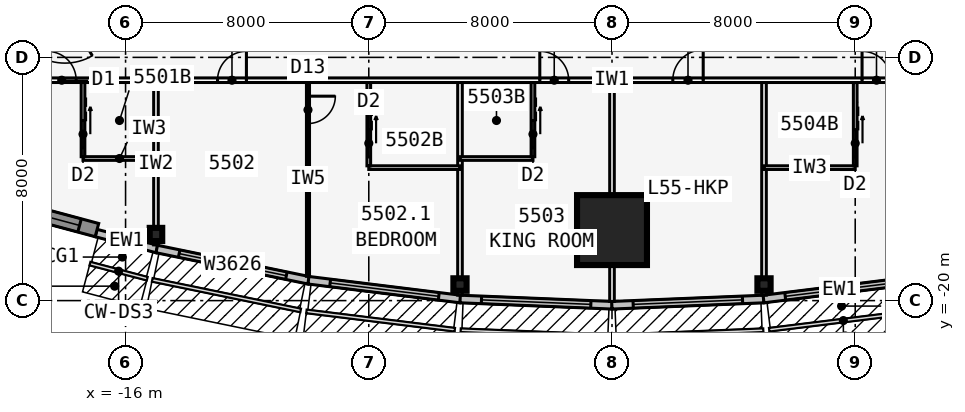
"""IFC4 building model, lengths in metres.
Left out: names, types, materials, properties, quantities, classifications, styles, units other than length and angle.
Written with IfcOpenShell. Run it as: python <this file> out.ifc"""

import sys

from ifc_helpers import new_model, si_unit, direction, frame, frame_2d, origin, origin_2d, place, context, subcontext, project, spatial, rectangle, i_section, extrude, element, fill, save


model = new_model("IFC4")
c1 = context("Model", 3, precision=1e-05, world=origin(), true_north=direction((0.0, 1.0)))
c2 = subcontext(c1, "Body", "Model", "MODEL_VIEW")
j1 = project(units=[si_unit("LENGTHUNIT", "METRE"), si_unit("PLANEANGLEUNIT", "RADIAN")], contexts=[c1])
p1 = place(None, origin())
s1 = spatial("IfcSite", under=j1, at=p1, CompositionType="ELEMENT")
p2 = place(p1, origin())
s2 = spatial("IfcBuilding", under=s1, at=p2, CompositionType="ELEMENT")
p3 = place(p2, frame((0.0, 0.0, 208.1)))
s3 = spatial("IfcBuildingStorey", under=s2, at=p3, CompositionType="ELEMENT", Elevation=208.1)
p4 = place(p3, frame((-16.5, -9.526, 0.0), z_axis=(0.0, 0.0, 1.0), x_axis=(-0.866031398331, -0.499989616998, 0.0)))
e1 = element("IfcWall", 1, at=p4, inside=s3, PredefinedType="SHEAR", context=c2, shape_type="SweptSolid", body=[
    extrude(rectangle(XDim=4.746, YDim=0.75, at=frame_2d((2.373, 0.0))), origin(), (0.0, 0.0, 1.0), 3.6),
])
p5 = place(p4, frame((1.725, 0.0, 0.0)))
e2 = element("IfcOpeningElement", 2, at=p5, cuts=e1, PredefinedType="OPENING", context=c2, shape_type="SweptSolid", body=[
    extrude(rectangle(XDim=1.8, YDim=2.13, at=frame_2d((0.9, 1.065))), frame((0.0, 0.385, 0.0), z_axis=(0.0, -1.0, 0.0), x_axis=(1.0, 0.0, 0.0)), (0.0, 0.0, 1.0), 0.77),
])
for number, where, z_axis, x_axis in (
    (3, (-15.0, -17.825, 0.0), (0.0, 0.0, 1.0), (1.0, 0.0, 0.0)),
    (4, (-5.0, -19.472, 0.0), (0.0, 0.0, 1.0), (0.0, -1.0, 0.0)),
    (5, (5.0, -19.472, 0.0), (0.0, 0.0, 1.0), (0.0, -1.0, 0.0)),
):
    element("IfcColumn", number, at=place(p3, frame(where, z_axis=z_axis, x_axis=x_axis)), inside=s3, PredefinedType="COLUMN", context=c2, shape_type="SweptSolid", body=[
        extrude(i_section(OverallWidth=0.411, OverallDepth=0.434, WebThickness=0.036, FlangeThickness=0.057, at=origin_2d()), origin(), (0.0, 0.0, 1.0), 3.6),
    ])
p6 = place(p3, frame((0.0, -17.68, 0.0), z_axis=(0.0, 0.0, 1.0), x_axis=(0.0, -1.0, 0.0)))
e6 = element("IfcColumn", 6, at=p6, inside=s3, PredefinedType="COLUMN", context=c2, shape_type="SweptSolid", body=[
    extrude(rectangle(XDim=2.3, YDim=2.3, at=origin_2d()), origin(), (0.0, 0.0, 1.0), 3.6),
])
p7 = place(p3, frame((-16.968, -17.777, 0.0), z_axis=(0.0, 0.0, 1.0), x_axis=(0.967010286052, -0.254737328772, 0.0)))
e7 = element("IfcWall", 7, at=p7, inside=s3, PredefinedType="STANDARD", context=c2, shape_type="SweptSolid", body=[
    extrude(rectangle(XDim=2.068, YDim=0.25, at=frame_2d((1.034, 0.0))), origin(), (0.0, 0.0, 1.0), 3.435),
])
p8 = place(p3, frame((-14.975, -18.302, 0.0), z_axis=(0.0, 0.0, 1.0), x_axis=(0.979461488189, -0.201631329795, 0.0)))
e8 = element("IfcWall", 8, at=p8, inside=s3, PredefinedType="STANDARD", context=c2, shape_type="SweptSolid", body=[
    extrude(rectangle(XDim=5.105, YDim=0.25, at=frame_2d((2.552, 0.0))), origin(), (0.0, 0.0, 1.0), 3.435),
])
p9 = place(p8, frame((0.752, 0.0, 0.45)))
e9 = element("IfcOpeningElement", 9, at=p9, cuts=e8, PredefinedType="OPENING", context=c2, shape_type="SweptSolid", body=[
    extrude(rectangle(XDim=3.6, YDim=2.6, at=frame_2d((1.8, 1.3))), frame((0.0, 0.135, 0.0), z_axis=(0.0, -1.0, 0.0), x_axis=(1.0, 0.0, 0.0)), (0.0, 0.0, 1.0), 0.27),
])
p10 = place(p3, frame((-9.985, -19.33, 0.0), z_axis=(0.0, 0.0, 1.0), x_axis=(0.992449874964, -0.12265090984, 0.0)))
e10 = element("IfcWall", 10, at=p10, inside=s3, PredefinedType="STANDARD", context=c2, shape_type="SweptSolid", body=[
    extrude(rectangle(XDim=5.038, YDim=0.25, at=frame_2d((2.519, 0.0))), origin(), (0.0, 0.0, 1.0), 3.435),
])
p11 = place(p10, frame((0.719, 0.0, 0.45)))
e11 = element("IfcOpeningElement", 11, at=p11, cuts=e10, PredefinedType="OPENING", context=c2, shape_type="SweptSolid", body=[
    extrude(rectangle(XDim=3.6, YDim=2.6, at=frame_2d((1.8, 1.3))), frame((0.0, 0.135, 0.0), z_axis=(0.0, -1.0, 0.0), x_axis=(1.0, 0.0, 0.0)), (0.0, 0.0, 1.0), 0.27),
])
p12 = place(p3, frame((-4.995, -19.947, 0.0), z_axis=(0.0, 0.0, 1.0), x_axis=(0.999151909423, -0.041175986892, 0.0)))
e12 = element("IfcWall", 12, at=p12, inside=s3, PredefinedType="STANDARD", context=c2, shape_type="SweptSolid", body=[
    extrude(rectangle(XDim=5.004, YDim=0.25, at=frame_2d((2.502, 0.0))), origin(), (0.0, 0.0, 1.0), 3.435),
])
p13 = place(p12, frame((0.702, 0.0, 0.45)))
e13 = element("IfcOpeningElement", 13, at=p13, cuts=e12, PredefinedType="OPENING", context=c2, shape_type="SweptSolid", body=[
    extrude(rectangle(XDim=3.6, YDim=2.6, at=frame_2d((1.8, 1.3))), frame((0.0, 0.135, 0.0), z_axis=(0.0, -1.0, 0.0), x_axis=(1.0, 0.0, 0.0)), (0.0, 0.0, 1.0), 0.27),
])
p14 = place(p3, frame((-0.005, -20.153, 0.0), z_axis=(0.0, 0.0, 1.0), x_axis=(0.999151909423, 0.041175986892, 0.0)))
e14 = element("IfcWall", 14, at=p14, inside=s3, PredefinedType="STANDARD", context=c2, shape_type="SweptSolid", body=[
    extrude(rectangle(XDim=5.004, YDim=0.25, at=frame_2d((2.502, 0.0))), origin(), (0.0, 0.0, 1.0), 3.435),
])
p15 = place(p14, frame((0.702, 0.0, 0.45)))
e15 = element("IfcOpeningElement", 15, at=p15, cuts=e14, PredefinedType="OPENING", context=c2, shape_type="SweptSolid", body=[
    extrude(rectangle(XDim=3.6, YDim=2.6, at=frame_2d((1.8, 1.3))), frame((0.0, 0.135, 0.0), z_axis=(0.0, -1.0, 0.0), x_axis=(1.0, 0.0, 0.0)), (0.0, 0.0, 1.0), 0.27),
])
p16 = place(p3, frame((4.985, -19.948, 0.0), z_axis=(0.0, 0.0, 1.0), x_axis=(0.992449874964, 0.12265090984, 0.0)))
e16 = element("IfcWall", 16, at=p16, inside=s3, PredefinedType="STANDARD", context=c2, shape_type="SweptSolid", body=[
    extrude(rectangle(XDim=5.038, YDim=0.25, at=frame_2d((2.519, 0.0))), origin(), (0.0, 0.0, 1.0), 3.435),
])
p17 = place(p16, frame((0.719, 0.0, 0.45)))
e17 = element("IfcOpeningElement", 17, at=p17, cuts=e16, PredefinedType="OPENING", context=c2, shape_type="SweptSolid", body=[
    extrude(rectangle(XDim=3.6, YDim=2.6, at=frame_2d((1.8, 1.3))), frame((0.0, 0.135, 0.0), z_axis=(0.0, -1.0, 0.0), x_axis=(1.0, 0.0, 0.0)), (0.0, 0.0, 1.0), 0.27),
])
p18 = place(p3, frame((-20.983, -16.598, 0.0), z_axis=(0.0, 0.0, 1.0), x_axis=(0.965920442324, -0.258839137498, 0.0)))
e18 = element("IfcWall", 18, at=p18, inside=s3, PredefinedType="SOLIDWALL", context=c2, shape_type="SweptSolid", body=[
    extrude(rectangle(XDim=4.184, YDim=0.45, at=frame_2d((2.092, 0.0))), origin(), (0.0, 0.0, 1.0), 3.435),
])
p19 = place(p18, frame((0.592, 0.0, 0.45)))
e19 = element("IfcOpeningElement", 19, at=p19, cuts=e18, PredefinedType="OPENING", context=c2, shape_type="SweptSolid", body=[
    extrude(rectangle(XDim=3.0, YDim=2.6, at=frame_2d((1.5, 1.3))), frame((0.0, 0.235, 0.0), z_axis=(0.0, -1.0, 0.0), x_axis=(1.0, 0.0, 0.0)), (0.0, 0.0, 1.0), 0.47),
])
p20 = place(p3, frame((-21.236, -12.751, 0.0), z_axis=(0.0, 0.0, 1.0), x_axis=(1.0, 0.0, 0.0)))
e20 = element("IfcWall", 20, at=p20, inside=s3, PredefinedType="PARTITIONING", context=c2, shape_type="SweptSolid", body=[
    extrude(rectangle(XDim=42.472, YDim=0.15, at=frame_2d((21.236, 0.0))), origin(), (0.0, 0.0, 1.0), 3.435),
])
p21 = place(p20, frame((2.661, 0.0, 0.0)))
e21 = element("IfcOpeningElement", 21, at=p21, cuts=e20, PredefinedType="OPENING", context=c2, shape_type="SweptSolid", body=[
    extrude(rectangle(XDim=0.95, YDim=2.13, at=frame_2d((0.475, 1.065))), frame((0.0, 0.085, 0.0), z_axis=(0.0, -1.0, 0.0), x_axis=(1.0, 0.0, 0.0)), (0.0, 0.0, 1.0), 0.17),
])
p22 = place(p20, frame((8.261, 0.0, 0.0)))
e22 = element("IfcOpeningElement", 22, at=p22, cuts=e20, PredefinedType="OPENING", context=c2, shape_type="SweptSolid", body=[
    extrude(rectangle(XDim=0.95, YDim=2.13, at=frame_2d((0.475, 1.065))), frame((0.0, 0.085, 0.0), z_axis=(0.0, -1.0, 0.0), x_axis=(1.0, 0.0, 0.0)), (0.0, 0.0, 1.0), 0.17),
])
p23 = place(p20, frame((18.861, 0.0, 0.0)))
e23 = element("IfcOpeningElement", 23, at=p23, cuts=e20, PredefinedType="OPENING", context=c2, shape_type="SweptSolid", body=[
    extrude(rectangle(XDim=0.95, YDim=2.13, at=frame_2d((0.475, 1.065))), frame((0.0, 0.085, 0.0), z_axis=(0.0, -1.0, 0.0), x_axis=(1.0, 0.0, 0.0)), (0.0, 0.0, 1.0), 0.17),
])
p24 = place(p20, frame((23.236, 0.0, 0.0)))
e24 = element("IfcOpeningElement", 24, at=p24, cuts=e20, PredefinedType="OPENING", context=c2, shape_type="SweptSolid", body=[
    extrude(rectangle(XDim=1.0, YDim=2.13, at=frame_2d((0.5, 1.065))), frame((0.0, 0.085, 0.0), z_axis=(0.0, -1.0, 0.0), x_axis=(1.0, 0.0, 0.0)), (0.0, 0.0, 1.0), 0.17),
])
p25 = place(p20, frame((29.461, 0.0, 0.0)))
e25 = element("IfcOpeningElement", 25, at=p25, cuts=e20, PredefinedType="OPENING", context=c2, shape_type="SweptSolid", body=[
    extrude(rectangle(XDim=0.95, YDim=2.13, at=frame_2d((0.475, 1.065))), frame((0.0, 0.085, 0.0), z_axis=(0.0, -1.0, 0.0), x_axis=(1.0, 0.0, 0.0)), (0.0, 0.0, 1.0), 0.17),
])
p26 = place(p20, frame((38.861, 0.0, 0.0)))
e26 = element("IfcOpeningElement", 26, at=p26, cuts=e20, PredefinedType="OPENING", context=c2, shape_type="SweptSolid", body=[
    extrude(rectangle(XDim=0.95, YDim=2.13, at=frame_2d((0.475, 1.065))), frame((0.0, 0.085, 0.0), z_axis=(0.0, -1.0, 0.0), x_axis=(1.0, 0.0, 0.0)), (0.0, 0.0, 1.0), 0.17),
])
p27 = place(p3, frame((-15.0, -12.826, 0.0), z_axis=(0.0, 0.0, 1.0), x_axis=(0.0, -1.0, 0.0)))
e27 = element("IfcWall", 27, at=p27, inside=s3, PredefinedType="PARTITIONING", context=c2, shape_type="SweptSolid", body=[
    extrude(rectangle(XDim=5.34, YDim=0.15, at=frame_2d((2.67, 0.0))), origin(), (0.0, 0.0, 1.0), 2.589),
])
p28 = place(p3, frame((-10.0, -12.826, 0.0), z_axis=(0.0, 0.0, 1.0), x_axis=(0.0, -1.0, 0.0)))
e28 = element("IfcWall", 28, at=p28, inside=s3, PredefinedType="PARTITIONING", context=c2, shape_type="SweptSolid", body=[
    extrude(rectangle(XDim=6.373, YDim=0.1, at=frame_2d((3.187, 0.0))), origin(), (0.0, 0.0, 1.0), 2.589),
])
p29 = place(p28, frame((0.45, 0.0, 0.0)))
e29 = element("IfcOpeningElement", 29, at=p29, cuts=e28, PredefinedType="OPENING", context=c2, shape_type="SweptSolid", body=[
    extrude(rectangle(XDim=0.9, YDim=2.13, at=frame_2d((0.45, 1.065))), frame((0.0, 0.06, 0.0), z_axis=(0.0, -1.0, 0.0), x_axis=(1.0, 0.0, 0.0)), (0.0, 0.0, 1.0), 0.12),
])
p30 = place(p3, frame((-5.0, -12.826, 0.0), z_axis=(0.0, 0.0, 1.0), x_axis=(0.0, -1.0, 0.0)))
e30 = element("IfcWall", 30, at=p30, inside=s3, PredefinedType="PARTITIONING", context=c2, shape_type="SweptSolid", body=[
    extrude(rectangle(XDim=6.994, YDim=0.15, at=frame_2d((3.497, 0.0))), origin(), (0.0, 0.0, 1.0), 2.589),
])
p31 = place(p3, frame((0.0, -12.826, 0.0), z_axis=(0.0, 0.0, 1.0), x_axis=(0.0, -1.0, 0.0)))
e31 = element("IfcWall", 31, at=p31, inside=s3, PredefinedType="PARTITIONING", context=c2, shape_type="SweptSolid", body=[
    extrude(rectangle(XDim=7.201, YDim=0.15, at=frame_2d((3.601, 0.0))), origin(), (0.0, 0.0, 1.0), 2.589),
])
p32 = place(p3, frame((5.0, -12.826, 0.0), z_axis=(0.0, 0.0, 1.0), x_axis=(0.0, -1.0, 0.0)))
e32 = element("IfcWall", 32, at=p32, inside=s3, PredefinedType="PARTITIONING", context=c2, shape_type="SweptSolid", body=[
    extrude(rectangle(XDim=6.994, YDim=0.15, at=frame_2d((3.497, 0.0))), origin(), (0.0, 0.0, 1.0), 2.589),
])
p33 = place(p3, frame((-17.4, -15.326, 0.0), z_axis=(0.0, 0.0, 1.0), x_axis=(1.0, 0.0, 0.0)))
e33 = element("IfcWall", 33, at=p33, inside=s3, PredefinedType="PLUMBINGWALL", context=c2, shape_type="SweptSolid", body=[
    extrude(rectangle(XDim=2.4, YDim=0.12, at=frame_2d((1.2, 0.0))), origin(), (0.0, 0.0, 1.0), 3.435),
])
p34 = place(p3, frame((-17.4, -12.826, 0.0), z_axis=(0.0, 0.0, 1.0), x_axis=(0.0, -1.0, 0.0)))
e34 = element("IfcWall", 34, at=p34, inside=s3, PredefinedType="PLUMBINGWALL", context=c2, shape_type="SweptSolid", body=[
    extrude(rectangle(XDim=2.44, YDim=0.12, at=frame_2d((1.22, 0.0))), origin(), (0.0, 0.0, 1.0), 3.435),
])
p35 = place(p34, frame((1.25, 0.0, 0.0)))
e35 = element("IfcOpeningElement", 35, at=p35, cuts=e34, PredefinedType="OPENING", context=c2, shape_type="SweptSolid", body=[
    extrude(rectangle(XDim=0.9, YDim=2.13, at=frame_2d((0.45, 1.065))), frame((0.0, 0.07, 0.0), z_axis=(0.0, -1.0, 0.0), x_axis=(1.0, 0.0, 0.0)), (0.0, 0.0, 1.0), 0.14),
])
p36 = place(p3, frame((-8.0, -15.626, 0.0), z_axis=(0.0, 0.0, 1.0), x_axis=(1.0, 0.0, 0.0)))
e36 = element("IfcWall", 36, at=p36, inside=s3, PredefinedType="PLUMBINGWALL", context=c2, shape_type="SweptSolid", body=[
    extrude(rectangle(XDim=3.0, YDim=0.12, at=frame_2d((1.5, 0.0))), origin(), (0.0, 0.0, 1.0), 3.435),
])
p37 = place(p3, frame((-8.0, -12.826, 0.0), z_axis=(0.0, 0.0, 1.0), x_axis=(0.0, -1.0, 0.0)))
e37 = element("IfcWall", 37, at=p37, inside=s3, PredefinedType="PLUMBINGWALL", context=c2, shape_type="SweptSolid", body=[
    extrude(rectangle(XDim=2.74, YDim=0.12, at=frame_2d((1.37, 0.0))), origin(), (0.0, 0.0, 1.0), 3.435),
])
p38 = place(p37, frame((1.55, 0.0, 0.0)))
e38 = element("IfcOpeningElement", 38, at=p38, cuts=e37, PredefinedType="OPENING", context=c2, shape_type="SweptSolid", body=[
    extrude(rectangle(XDim=0.9, YDim=2.13, at=frame_2d((0.45, 1.065))), frame((0.0, 0.07, 0.0), z_axis=(0.0, -1.0, 0.0), x_axis=(1.0, 0.0, 0.0)), (0.0, 0.0, 1.0), 0.14),
])
p39 = place(p3, frame((-5.0, -15.326, 0.0), z_axis=(0.0, 0.0, 1.0), x_axis=(1.0, 0.0, 0.0)))
e39 = element("IfcWall", 39, at=p39, inside=s3, PredefinedType="PLUMBINGWALL", context=c2, shape_type="SweptSolid", body=[
    extrude(rectangle(XDim=2.4, YDim=0.12, at=frame_2d((1.2, 0.0))), origin(), (0.0, 0.0, 1.0), 3.435),
])
p40 = place(p3, frame((-2.6, -12.826, 0.0), z_axis=(0.0, 0.0, 1.0), x_axis=(0.0, -1.0, 0.0)))
e40 = element("IfcWall", 40, at=p40, inside=s3, PredefinedType="PLUMBINGWALL", context=c2, shape_type="SweptSolid", body=[
    extrude(rectangle(XDim=2.44, YDim=0.12, at=frame_2d((1.22, 0.0))), origin(), (0.0, 0.0, 1.0), 3.435),
])
p41 = place(p40, frame((1.25, 0.0, 0.0)))
e41 = element("IfcOpeningElement", 41, at=p41, cuts=e40, PredefinedType="OPENING", context=c2, shape_type="SweptSolid", body=[
    extrude(rectangle(XDim=0.9, YDim=2.13, at=frame_2d((0.45, 1.065))), frame((0.0, 0.07, 0.0), z_axis=(0.0, -1.0, 0.0), x_axis=(1.0, 0.0, 0.0)), (0.0, 0.0, 1.0), 0.14),
])
p42 = place(p3, frame((5.0, -15.626, 0.0), z_axis=(0.0, 0.0, 1.0), x_axis=(1.0, 0.0, 0.0)))
e42 = element("IfcWall", 42, at=p42, inside=s3, PredefinedType="PLUMBINGWALL", context=c2, shape_type="SweptSolid", body=[
    extrude(rectangle(XDim=3.0, YDim=0.12, at=frame_2d((1.5, 0.0))), origin(), (0.0, 0.0, 1.0), 3.435),
])
p43 = place(p3, frame((8.0, -12.826, 0.0), z_axis=(0.0, 0.0, 1.0), x_axis=(0.0, -1.0, 0.0)))
e43 = element("IfcWall", 43, at=p43, inside=s3, PredefinedType="PLUMBINGWALL", context=c2, shape_type="SweptSolid", body=[
    extrude(rectangle(XDim=2.74, YDim=0.12, at=frame_2d((1.37, 0.0))), origin(), (0.0, 0.0, 1.0), 3.435),
])
p44 = place(p43, frame((1.55, 0.0, 0.0)))
e44 = element("IfcOpeningElement", 44, at=p44, cuts=e43, PredefinedType="OPENING", context=c2, shape_type="SweptSolid", body=[
    extrude(rectangle(XDim=0.9, YDim=2.13, at=frame_2d((0.45, 1.065))), frame((0.0, 0.07, 0.0), z_axis=(0.0, -1.0, 0.0), x_axis=(1.0, 0.0, 0.0)), (0.0, 0.0, 1.0), 0.14),
])
p45 = place(p9, origin())
e45 = element("IfcWindow", 45, at=p45, inside=s3, PartitioningType="SINGLE_PANEL", PredefinedType="WINDOW", context=c2, shape_type="SweptSolid", body=[
    extrude(rectangle(XDim=3.6, YDim=2.6, at=frame_2d((1.8, 1.3))), frame((0.0, 0.03, 0.0), z_axis=(0.0, -1.0, 0.0), x_axis=(1.0, 0.0, 0.0)), (0.0, 0.0, 1.0), 0.06),
])
fill(e9, e45)
p46 = place(p11, origin())
e46 = element("IfcWindow", 46, at=p46, inside=s3, PartitioningType="SINGLE_PANEL", PredefinedType="WINDOW", context=c2, shape_type="SweptSolid", body=[
    extrude(rectangle(XDim=3.6, YDim=2.6, at=frame_2d((1.8, 1.3))), frame((0.0, 0.03, 0.0), z_axis=(0.0, -1.0, 0.0), x_axis=(1.0, 0.0, 0.0)), (0.0, 0.0, 1.0), 0.06),
])
fill(e11, e46)
p47 = place(p13, origin())
e47 = element("IfcWindow", 47, at=p47, inside=s3, PartitioningType="SINGLE_PANEL", PredefinedType="WINDOW", context=c2, shape_type="SweptSolid", body=[
    extrude(rectangle(XDim=3.6, YDim=2.6, at=frame_2d((1.8, 1.3))), frame((0.0, 0.03, 0.0), z_axis=(0.0, -1.0, 0.0), x_axis=(1.0, 0.0, 0.0)), (0.0, 0.0, 1.0), 0.06),
])
fill(e13, e47)
p48 = place(p15, origin())
e48 = element("IfcWindow", 48, at=p48, inside=s3, PartitioningType="SINGLE_PANEL", PredefinedType="WINDOW", context=c2, shape_type="SweptSolid", body=[
    extrude(rectangle(XDim=3.6, YDim=2.6, at=frame_2d((1.8, 1.3))), frame((0.0, 0.03, 0.0), z_axis=(0.0, -1.0, 0.0), x_axis=(1.0, 0.0, 0.0)), (0.0, 0.0, 1.0), 0.06),
])
fill(e15, e48)
p49 = place(p17, origin())
e49 = element("IfcWindow", 49, at=p49, inside=s3, PartitioningType="SINGLE_PANEL", PredefinedType="WINDOW", context=c2, shape_type="SweptSolid", body=[
    extrude(rectangle(XDim=3.6, YDim=2.6, at=frame_2d((1.8, 1.3))), frame((0.0, 0.03, 0.0), z_axis=(0.0, -1.0, 0.0), x_axis=(1.0, 0.0, 0.0)), (0.0, 0.0, 1.0), 0.06),
])
fill(e17, e49)
p50 = place(p19, origin())
e50 = element("IfcWindow", 50, at=p50, inside=s3, PartitioningType="SINGLE_PANEL", PredefinedType="WINDOW", context=c2, shape_type="SweptSolid", body=[
    extrude(rectangle(XDim=3.0, YDim=2.6, at=frame_2d((1.5, 1.3))), frame((0.0, 0.03, 0.0), z_axis=(0.0, -1.0, 0.0), x_axis=(1.0, 0.0, 0.0)), (0.0, 0.0, 1.0), 0.06),
])
fill(e19, e50)
p51 = place(p29, origin())
e51 = element("IfcDoor", 51, at=p51, inside=s3, OperationType="SINGLE_SWING_LEFT", PredefinedType="DOOR", context=c2, shape_type="SweptSolid", body=[
    extrude(rectangle(XDim=0.9, YDim=2.13, at=frame_2d((0.45, 1.065))), frame((0.0, 0.025, 0.0), z_axis=(0.0, -1.0, 0.0), x_axis=(1.0, 0.0, 0.0)), (0.0, 0.0, 1.0), 0.05),
])
fill(e29, e51)
p52 = place(p35, origin())
e52 = element("IfcDoor", 52, at=p52, inside=s3, OperationType="SLIDING_TO_LEFT", PredefinedType="DOOR", context=c2, shape_type="SweptSolid", body=[
    extrude(rectangle(XDim=0.9, YDim=2.13, at=frame_2d((0.45, 1.065))), frame((0.0, 0.025, 0.0), z_axis=(0.0, -1.0, 0.0), x_axis=(1.0, 0.0, 0.0)), (0.0, 0.0, 1.0), 0.05),
])
fill(e35, e52)
p53 = place(p21, origin())
e53 = element("IfcDoor", 53, at=p53, inside=s3, OperationType="SINGLE_SWING_LEFT", PredefinedType="DOOR", context=c2, shape_type="SweptSolid", body=[
    extrude(rectangle(XDim=0.95, YDim=2.13, at=frame_2d((0.475, 1.065))), frame((0.0, 0.025, 0.0), z_axis=(0.0, -1.0, 0.0), x_axis=(1.0, 0.0, 0.0)), (0.0, 0.0, 1.0), 0.05),
])
fill(e21, e53)
p54 = place(p22, origin())
e54 = element("IfcDoor", 54, at=p54, inside=s3, OperationType="SINGLE_SWING_RIGHT", PredefinedType="DOOR", context=c2, shape_type="SweptSolid", body=[
    extrude(rectangle(XDim=0.95, YDim=2.13, at=frame_2d((0.475, 1.065))), frame((0.0, 0.025, 0.0), z_axis=(0.0, -1.0, 0.0), x_axis=(1.0, 0.0, 0.0)), (0.0, 0.0, 1.0), 0.05),
])
fill(e22, e54)
p55 = place(p38, origin())
e55 = element("IfcDoor", 55, at=p55, inside=s3, OperationType="SLIDING_TO_LEFT", PredefinedType="DOOR", context=c2, shape_type="SweptSolid", body=[
    extrude(rectangle(XDim=0.9, YDim=2.13, at=frame_2d((0.45, 1.065))), frame((0.0, 0.025, 0.0), z_axis=(0.0, -1.0, 0.0), x_axis=(1.0, 0.0, 0.0)), (0.0, 0.0, 1.0), 0.05),
])
fill(e38, e55)
p56 = place(p41, origin())
e56 = element("IfcDoor", 56, at=p56, inside=s3, OperationType="SLIDING_TO_LEFT", PredefinedType="DOOR", context=c2, shape_type="SweptSolid", body=[
    extrude(rectangle(XDim=0.9, YDim=2.13, at=frame_2d((0.45, 1.065))), frame((0.0, 0.025, 0.0), z_axis=(0.0, -1.0, 0.0), x_axis=(1.0, 0.0, 0.0)), (0.0, 0.0, 1.0), 0.05),
])
fill(e41, e56)
p57 = place(p23, origin())
e57 = element("IfcDoor", 57, at=p57, inside=s3, OperationType="SINGLE_SWING_LEFT", PredefinedType="DOOR", context=c2, shape_type="SweptSolid", body=[
    extrude(rectangle(XDim=0.95, YDim=2.13, at=frame_2d((0.475, 1.065))), frame((0.0, 0.025, 0.0), z_axis=(0.0, -1.0, 0.0), x_axis=(1.0, 0.0, 0.0)), (0.0, 0.0, 1.0), 0.05),
])
fill(e23, e57)
p58 = place(p24, origin())
e58 = element("IfcDoor", 58, at=p58, inside=s3, OperationType="SINGLE_SWING_RIGHT", PredefinedType="DOOR", context=c2, shape_type="SweptSolid", body=[
    extrude(rectangle(XDim=1.0, YDim=2.13, at=frame_2d((0.5, 1.065))), frame((0.0, 0.025, 0.0), z_axis=(0.0, -1.0, 0.0), x_axis=(1.0, 0.0, 0.0)), (0.0, 0.0, 1.0), 0.05),
])
fill(e24, e58)
p59 = place(p44, origin())
e59 = element("IfcDoor", 59, at=p59, inside=s3, OperationType="SLIDING_TO_LEFT", PredefinedType="DOOR", context=c2, shape_type="SweptSolid", body=[
    extrude(rectangle(XDim=0.9, YDim=2.13, at=frame_2d((0.45, 1.065))), frame((0.0, 0.025, 0.0), z_axis=(0.0, -1.0, 0.0), x_axis=(1.0, 0.0, 0.0)), (0.0, 0.0, 1.0), 0.05),
])
fill(e44, e59)
p60 = place(p25, origin())
e60 = element("IfcDoor", 60, at=p60, inside=s3, OperationType="SINGLE_SWING_LEFT", PredefinedType="DOOR", context=c2, shape_type="SweptSolid", body=[
    extrude(rectangle(XDim=0.95, YDim=2.13, at=frame_2d((0.475, 1.065))), frame((0.0, 0.025, 0.0), z_axis=(0.0, -1.0, 0.0), x_axis=(1.0, 0.0, 0.0)), (0.0, 0.0, 1.0), 0.05),
])
fill(e25, e60)
save(model, sys.argv[1])
